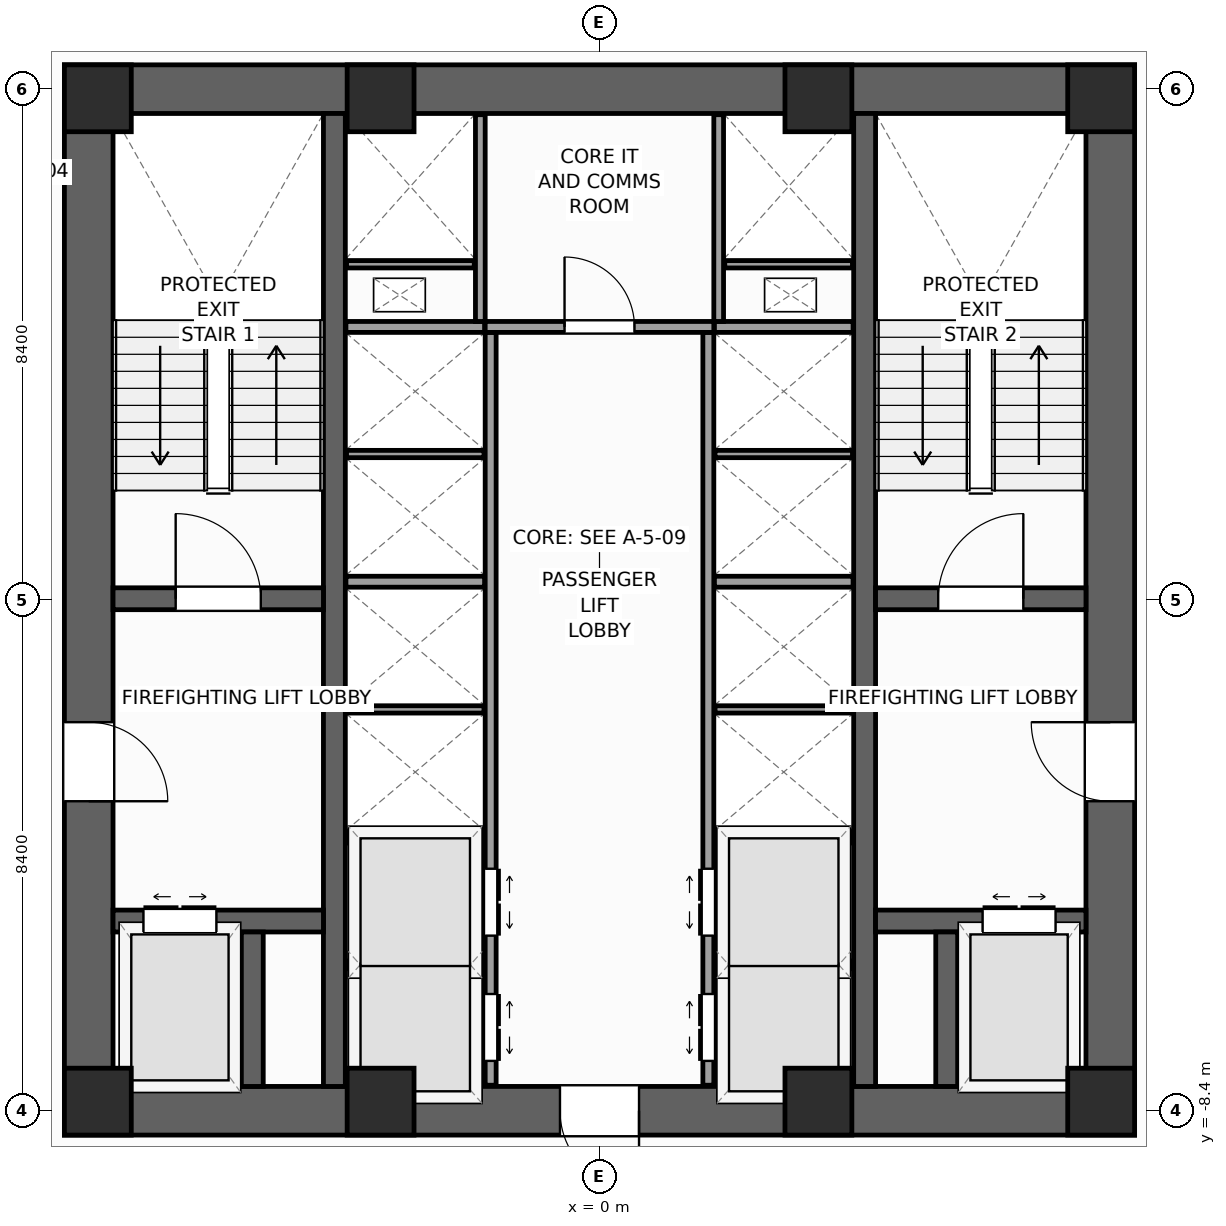
"""IFC4 building model, lengths in metres.
Left out: names, types, materials, properties, quantities, classifications, styles, units other than length and angle.
Written with IfcOpenShell. Run it as: python <this file> out.ifc"""

import sys

from ifc_helpers import new_model, si_unit, direction, frame, frame_2d, origin, origin_2d, place, context, subcontext, project, spatial, rectangle, extrude, source, transform, mapped, element, fill, save


model = new_model("IFC4")
c1 = context("Model", 3, precision=1e-05, world=origin(), true_north=direction((0.0, 1.0)))
c2 = subcontext(c1, "Body", "Model", "MODEL_VIEW")
j1 = project(units=[si_unit("LENGTHUNIT", "METRE"), si_unit("PLANEANGLEUNIT", "RADIAN")], contexts=[c1])
p1 = place(None, origin())
s1 = spatial("IfcSite", under=j1, at=p1, CompositionType="ELEMENT")
p2 = place(p1, origin())
s2 = spatial("IfcBuilding", under=s1, at=p2, CompositionType="ELEMENT")
p3 = place(p2, frame((0.0, 0.0, 46.0)))
s3 = spatial("IfcBuildingStorey", under=s2, at=p3, CompositionType="ELEMENT", Elevation=46.0)
p4 = place(p3, frame((-8.8, -8.4, 0.0), z_axis=(0.0, 0.0, 1.0), x_axis=(1.0, 0.0, 0.0)))
e1 = element("IfcWall", 1, at=p4, inside=s3, PredefinedType="SHEAR", context=c2, shape_type="SweptSolid", body=[
    extrude(rectangle(XDim=17.6, YDim=0.8, at=frame_2d((8.8, 0.0))), origin(), (0.0, 0.0, 1.0), 4.0),
])
p5 = place(p4, frame((8.15, 0.0, 0.0)))
e2 = element("IfcOpeningElement", 2, at=p5, cuts=e1, PredefinedType="OPENING", context=c2, shape_type="SweptSolid", body=[
    extrude(rectangle(XDim=1.3, YDim=2.2, at=frame_2d((0.65, 1.1))), frame((0.0, 0.41, 0.0), z_axis=(0.0, -1.0, 0.0), x_axis=(1.0, 0.0, 0.0)), (0.0, 0.0, 1.0), 0.82),
])
p6 = place(p3, frame((-8.8, 8.4, 0.0), z_axis=(0.0, 0.0, 1.0), x_axis=(1.0, 0.0, 0.0)))
e3 = element("IfcWall", 3, at=p6, inside=s3, PredefinedType="SHEAR", context=c2, shape_type="SweptSolid", body=[
    extrude(rectangle(XDim=17.6, YDim=0.8, at=frame_2d((8.8, 0.0))), origin(), (0.0, 0.0, 1.0), 4.0),
])
p7 = place(p3, frame((-8.4, -8.0, 0.0), z_axis=(0.0, 0.0, 1.0), x_axis=(0.0, 1.0, 0.0)))
e4 = element("IfcWall", 4, at=p7, inside=s3, PredefinedType="SHEAR", context=c2, shape_type="SweptSolid", body=[
    extrude(rectangle(XDim=16.0, YDim=0.8, at=frame_2d((8.0, 0.0))), origin(), (0.0, 0.0, 1.0), 4.0),
])
p8 = place(p7, frame((4.69, 0.0, 0.0)))
e5 = element("IfcOpeningElement", 5, at=p8, cuts=e4, PredefinedType="OPENING", context=c2, shape_type="SweptSolid", body=[
    extrude(rectangle(XDim=1.3, YDim=2.2, at=frame_2d((0.65, 1.1))), frame((0.0, 0.41, 0.0), z_axis=(0.0, -1.0, 0.0), x_axis=(1.0, 0.0, 0.0)), (0.0, 0.0, 1.0), 0.82),
])
p9 = place(p3, frame((8.4, -8.0, 0.0), z_axis=(0.0, 0.0, 1.0), x_axis=(0.0, 1.0, 0.0)))
e6 = element("IfcWall", 6, at=p9, inside=s3, PredefinedType="SHEAR", context=c2, shape_type="SweptSolid", body=[
    extrude(rectangle(XDim=16.0, YDim=0.8, at=frame_2d((8.0, 0.0))), origin(), (0.0, 0.0, 1.0), 4.0),
])
p10 = place(p9, frame((4.69, 0.0, 0.0)))
e7 = element("IfcOpeningElement", 7, at=p10, cuts=e6, PredefinedType="OPENING", context=c2, shape_type="SweptSolid", body=[
    extrude(rectangle(XDim=1.3, YDim=2.2, at=frame_2d((0.65, 1.1))), frame((0.0, 0.41, 0.0), z_axis=(0.0, -1.0, 0.0), x_axis=(1.0, 0.0, 0.0)), (0.0, 0.0, 1.0), 0.82),
])
for number, where, z_axis, x_axis in (
    (8, (-4.36, -8.0, 0.0), (0.0, 0.0, 1.0), (0.0, 1.0, 0.0)),
    (9, (4.36, -8.0, 0.0), (0.0, 0.0, 1.0), (0.0, 1.0, 0.0)),
):
    element("IfcWall", number, at=place(p3, frame(where, z_axis=z_axis, x_axis=x_axis)), inside=s3, PredefinedType="SHEAR", context=c2, shape_type="SweptSolid", body=[
        extrude(rectangle(XDim=16.0, YDim=0.36, at=frame_2d((8.0, 0.0))), origin(), (0.0, 0.0, 1.0), 4.0),
    ])
p11 = place(p3, frame((-8.0, 0.02, 0.0), z_axis=(0.0, 0.0, 1.0), x_axis=(1.0, 0.0, 0.0)))
e10 = element("IfcWall", 10, at=p11, inside=s3, PredefinedType="SHEAR", context=c2, shape_type="SweptSolid", body=[
    extrude(rectangle(XDim=3.46, YDim=0.36, at=frame_2d((1.73, 0.0))), origin(), (0.0, 0.0, 1.0), 4.0),
])
p12 = place(p11, frame((1.03, 0.0, 0.0)))
e11 = element("IfcOpeningElement", 11, at=p12, cuts=e10, PredefinedType="OPENING", context=c2, shape_type="SweptSolid", body=[
    extrude(rectangle(XDim=1.4, YDim=2.2, at=frame_2d((0.7, 1.1))), frame((0.0, 0.19, 0.0), z_axis=(0.0, -1.0, 0.0), x_axis=(1.0, 0.0, 0.0)), (0.0, 0.0, 1.0), 0.38),
])
p13 = place(p3, frame((4.54, 0.02, 0.0), z_axis=(0.0, 0.0, 1.0), x_axis=(1.0, 0.0, 0.0)))
e12 = element("IfcWall", 12, at=p13, inside=s3, PredefinedType="SHEAR", context=c2, shape_type="SweptSolid", body=[
    extrude(rectangle(XDim=3.46, YDim=0.36, at=frame_2d((1.73, 0.0))), origin(), (0.0, 0.0, 1.0), 4.0),
])
p14 = place(p13, frame((1.03, 0.0, 0.0)))
e13 = element("IfcOpeningElement", 13, at=p14, cuts=e12, PredefinedType="OPENING", context=c2, shape_type="SweptSolid", body=[
    extrude(rectangle(XDim=1.4, YDim=2.2, at=frame_2d((0.7, 1.1))), frame((0.0, 0.19, 0.0), z_axis=(0.0, -1.0, 0.0), x_axis=(1.0, 0.0, 0.0)), (0.0, 0.0, 1.0), 0.38),
])
p15 = place(p3, frame((-8.0, -5.28, 0.0), z_axis=(0.0, 0.0, 1.0), x_axis=(1.0, 0.0, 0.0)))
e14 = element("IfcWall", 14, at=p15, inside=s3, PredefinedType="SHEAR", context=c2, shape_type="SweptSolid", body=[
    extrude(rectangle(XDim=3.46, YDim=0.36, at=frame_2d((1.73, 0.0))), origin(), (0.0, 0.0, 1.0), 4.0),
])
p16 = place(p15, frame((0.5, 0.0, 0.0)))
e15 = element("IfcOpeningElement", 15, at=p16, cuts=e14, PredefinedType="OPENING", context=c2, shape_type="SweptSolid", body=[
    extrude(rectangle(XDim=1.2, YDim=2.25, at=frame_2d((0.6, 1.125))), frame((0.0, 0.19, 0.0), z_axis=(0.0, -1.0, 0.0), x_axis=(1.0, 0.0, 0.0)), (0.0, 0.0, 1.0), 0.38),
])
p17 = place(p3, frame((4.54, -5.28, 0.0), z_axis=(0.0, 0.0, 1.0), x_axis=(1.0, 0.0, 0.0)))
e16 = element("IfcWall", 16, at=p17, inside=s3, PredefinedType="SHEAR", context=c2, shape_type="SweptSolid", body=[
    extrude(rectangle(XDim=3.46, YDim=0.36, at=frame_2d((1.73, 0.0))), origin(), (0.0, 0.0, 1.0), 4.0),
])
p18 = place(p17, frame((1.76, 0.0, 0.0)))
e17 = element("IfcOpeningElement", 17, at=p18, cuts=e16, PredefinedType="OPENING", context=c2, shape_type="SweptSolid", body=[
    extrude(rectangle(XDim=1.2, YDim=2.25, at=frame_2d((0.6, 1.125))), frame((0.0, 0.19, 0.0), z_axis=(0.0, -1.0, 0.0), x_axis=(1.0, 0.0, 0.0)), (0.0, 0.0, 1.0), 0.38),
])
for number, where, z_axis, x_axis in (
    (18, (-5.71, -8.0, 0.0), (0.0, 0.0, 1.0), (0.0, 1.0, 0.0)),
    (19, (5.71, -8.0, 0.0), (0.0, 0.0, 1.0), (0.0, 1.0, 0.0)),
):
    element("IfcWall", number, at=place(p3, frame(where, z_axis=z_axis, x_axis=x_axis)), inside=s3, PredefinedType="SHEAR", context=c2, shape_type="SweptSolid", body=[
        extrude(rectangle(XDim=2.54, YDim=0.36, at=frame_2d((1.27, 0.0))), origin(), (0.0, 0.0, 1.0), 4.0),
    ])
m1 = source(origin(), c2, "Body", "SweptSolid", [
    extrude(rectangle(XDim=1.1, YDim=1.1, at=origin_2d()), origin(), (0.0, 0.0, 1.0), 4.0),
])
for number, where, z_axis, x_axis in (
    (20, (-8.25, -8.25, 0.0), (0.0, 0.0, 1.0), (1.0, 0.0, 0.0)),
    (21, (8.25, -8.25, 0.0), (0.0, 0.0, 1.0), (1.0, 0.0, 0.0)),
    (22, (8.25, 8.25, 0.0), (0.0, 0.0, 1.0), (1.0, 0.0, 0.0)),
    (23, (-8.25, 8.25, 0.0), (0.0, 0.0, 1.0), (1.0, 0.0, 0.0)),
    (24, (-3.6, -8.25, 0.0), (0.0, 0.0, 1.0), (1.0, 0.0, 0.0)),
    (25, (3.6, -8.25, 0.0), (0.0, 0.0, 1.0), (1.0, 0.0, 0.0)),
    (26, (-3.6, 8.25, 0.0), (0.0, 0.0, 1.0), (1.0, 0.0, 0.0)),
    (27, (3.6, 8.25, 0.0), (0.0, 0.0, 1.0), (1.0, 0.0, 0.0)),
):
    element("IfcColumn", number, at=place(p3, frame(where, z_axis=z_axis, x_axis=x_axis)), inside=s3, PredefinedType="PILASTER", context=c2, shape_type="MappedRepresentation", body=[
        mapped(m1, transform((0.0, 0.0, 0.0), scale=1.0)),
    ])
p19 = place(p3, frame((-1.79, -7.98, 0.0), z_axis=(0.0, 0.0, 1.0), x_axis=(0.0, 1.0, 0.0)))
e28 = element("IfcWall", 28, at=p19, inside=s3, PredefinedType="PARTITIONING", context=c2, shape_type="SweptSolid", body=[
    extrude(rectangle(XDim=12.38, YDim=0.18, at=frame_2d((6.19, 0.0))), origin(), (0.0, 0.0, 1.0), 3.72),
])
p20 = place(p19, frame((0.4, 0.0, 0.0)))
e29 = element("IfcOpeningElement", 29, at=p20, cuts=e28, PredefinedType="OPENING", context=c2, shape_type="SweptSolid", body=[
    extrude(rectangle(XDim=1.1, YDim=2.2, at=frame_2d((0.55, 1.1))), frame((0.0, 0.1, 0.0), z_axis=(0.0, -1.0, 0.0), x_axis=(1.0, 0.0, 0.0)), (0.0, 0.0, 1.0), 0.2),
])
p21 = place(p19, frame((2.46, 0.0, 0.0)))
e30 = element("IfcOpeningElement", 30, at=p21, cuts=e28, PredefinedType="OPENING", context=c2, shape_type="SweptSolid", body=[
    extrude(rectangle(XDim=1.1, YDim=2.2, at=frame_2d((0.55, 1.1))), frame((0.0, 0.1, 0.0), z_axis=(0.0, -1.0, 0.0), x_axis=(1.0, 0.0, 0.0)), (0.0, 0.0, 1.0), 0.2),
])
p22 = place(p3, frame((1.79, -7.98, 0.0), z_axis=(0.0, 0.0, 1.0), x_axis=(0.0, 1.0, 0.0)))
e31 = element("IfcWall", 31, at=p22, inside=s3, PredefinedType="PARTITIONING", context=c2, shape_type="SweptSolid", body=[
    extrude(rectangle(XDim=12.38, YDim=0.18, at=frame_2d((6.19, 0.0))), origin(), (0.0, 0.0, 1.0), 3.72),
])
p23 = place(p22, frame((0.4, 0.0, 0.0)))
e32 = element("IfcOpeningElement", 32, at=p23, cuts=e31, PredefinedType="OPENING", context=c2, shape_type="SweptSolid", body=[
    extrude(rectangle(XDim=1.1, YDim=2.2, at=frame_2d((0.55, 1.1))), frame((0.0, 0.1, 0.0), z_axis=(0.0, -1.0, 0.0), x_axis=(1.0, 0.0, 0.0)), (0.0, 0.0, 1.0), 0.2),
])
p24 = place(p22, frame((2.46, 0.0, 0.0)))
e33 = element("IfcOpeningElement", 33, at=p24, cuts=e31, PredefinedType="OPENING", context=c2, shape_type="SweptSolid", body=[
    extrude(rectangle(XDim=1.1, YDim=2.2, at=frame_2d((0.55, 1.1))), frame((0.0, 0.1, 0.0), z_axis=(0.0, -1.0, 0.0), x_axis=(1.0, 0.0, 0.0)), (0.0, 0.0, 1.0), 0.2),
])
p25 = place(p3, frame((-1.88, 4.49, 0.0), z_axis=(0.0, 0.0, 1.0), x_axis=(1.0, 0.0, 0.0)))
e34 = element("IfcWall", 34, at=p25, inside=s3, PredefinedType="PARTITIONING", context=c2, shape_type="SweptSolid", body=[
    extrude(rectangle(XDim=3.76, YDim=0.18, at=frame_2d((1.88, 0.0))), origin(), (0.0, 0.0, 1.0), 3.72),
])
p26 = place(p25, frame((1.305, 0.0, 0.0)))
e35 = element("IfcOpeningElement", 35, at=p26, cuts=e34, PredefinedType="OPENING", context=c2, shape_type="SweptSolid", body=[
    extrude(rectangle(XDim=1.15, YDim=2.25, at=frame_2d((0.575, 1.125))), frame((0.0, 0.1, 0.0), z_axis=(0.0, -1.0, 0.0), x_axis=(1.0, 0.0, 0.0)), (0.0, 0.0, 1.0), 0.2),
])
for number, where, z_axis, x_axis in (
    (36, (-4.17, -3.9, 0.0), (0.0, 0.0, 1.0), (1.0, 0.0, 0.0)),
    (37, (1.89, -3.9, 0.0), (0.0, 0.0, 1.0), (1.0, 0.0, 0.0)),
    (38, (-4.17, 0.3, 0.0), (0.0, 0.0, 1.0), (1.0, 0.0, 0.0)),
    (39, (1.89, 0.3, 0.0), (0.0, 0.0, 1.0), (1.0, 0.0, 0.0)),
    (40, (-4.17, 4.49, 0.0), (0.0, 0.0, 1.0), (1.0, 0.0, 0.0)),
    (41, (1.89, 4.49, 0.0), (0.0, 0.0, 1.0), (1.0, 0.0, 0.0)),
):
    element("IfcWall", number, at=place(p3, frame(where, z_axis=z_axis, x_axis=x_axis)), inside=s3, PredefinedType="PARTITIONING", context=c2, shape_type="SweptSolid", body=[
        extrude(rectangle(XDim=2.28, YDim=0.18, at=frame_2d((1.14, 0.0))), origin(), (0.0, 0.0, 1.0), 3.72),
    ])
for number, where, z_axis, x_axis in (
    (42, (-4.16, -6.0, 0.0), (0.0, 0.0, 1.0), (1.0, 0.0, 0.0)),
    (43, (1.9, -6.0, 0.0), (0.0, 0.0, 1.0), (1.0, 0.0, 0.0)),
    (44, (-4.16, -1.8, 0.0), (0.0, 0.0, 1.0), (1.0, 0.0, 0.0)),
    (45, (1.9, -1.8, 0.0), (0.0, 0.0, 1.0), (1.0, 0.0, 0.0)),
    (46, (-4.16, 2.4, 0.0), (0.0, 0.0, 1.0), (1.0, 0.0, 0.0)),
    (47, (1.9, 2.4, 0.0), (0.0, 0.0, 1.0), (1.0, 0.0, 0.0)),
):
    element("IfcWall", number, at=place(p3, frame(where, z_axis=z_axis, x_axis=x_axis)), inside=s3, PredefinedType="PARTITIONING", context=c2, shape_type="SweptSolid", body=[
        extrude(rectangle(XDim=2.26, YDim=0.12, at=frame_2d((1.13, 0.0))), origin(), (0.0, 0.0, 1.0), 3.72),
    ])
for number, where, z_axis, x_axis in (
    (48, (-1.96, 4.58, 0.0), (0.0, 0.0, 1.0), (0.0, 1.0, 0.0)),
    (49, (1.96, 4.58, 0.0), (0.0, 0.0, 1.0), (0.0, 1.0, 0.0)),
):
    element("IfcWall", number, at=place(p3, frame(where, z_axis=z_axis, x_axis=x_axis)), inside=s3, PredefinedType="PARTITIONING", context=c2, shape_type="SweptSolid", body=[
        extrude(rectangle(XDim=3.4, YDim=0.16, at=frame_2d((1.7, 0.0))), origin(), (0.0, 0.0, 1.0), 3.72),
    ])
for number, where, z_axis, x_axis in (
    (50, (-4.16, 5.52, 0.0), (0.0, 0.0, 1.0), (1.0, 0.0, 0.0)),
    (51, (2.06, 5.52, 0.0), (0.0, 0.0, 1.0), (1.0, 0.0, 0.0)),
):
    element("IfcWall", number, at=place(p3, frame(where, z_axis=z_axis, x_axis=x_axis)), inside=s3, PredefinedType="PARTITIONING", context=c2, shape_type="SweptSolid", body=[
        extrude(rectangle(XDim=2.1, YDim=0.12, at=frame_2d((1.05, 0.0))), origin(), (0.0, 0.0, 1.0), 3.72),
    ])
m2 = source(origin(), c2, "Body", "SweptSolid", [
    extrude(rectangle(XDim=1.4, YDim=2.2, at=frame_2d((0.7, 1.1))), frame((0.0, 0.025, 0.0), z_axis=(0.0, -1.0, 0.0), x_axis=(1.0, 0.0, 0.0)), (0.0, 0.0, 1.0), 0.05),
])
p27 = place(p12, origin())
e52 = element("IfcDoor", 52, at=p27, inside=s3, OperationType="SINGLE_SWING_LEFT", PredefinedType="DOOR", context=c2, shape_type="MappedRepresentation", body=[
    mapped(m2, transform((0.0, 0.0, 0.0), scale=1.0)),
])
fill(e11, e52)
p28 = place(p14, origin())
e53 = element("IfcDoor", 53, at=p28, inside=s3, OperationType="SINGLE_SWING_RIGHT", PredefinedType="DOOR", context=c2, shape_type="MappedRepresentation", body=[
    mapped(m2, transform((0.0, 0.0, 0.0), scale=1.0)),
])
fill(e13, e53)
m3 = source(origin(), c2, "Body", "SweptSolid", [
    extrude(rectangle(XDim=1.3, YDim=2.2, at=frame_2d((0.65, 1.1))), frame((0.0, 0.025, 0.0), z_axis=(0.0, -1.0, 0.0), x_axis=(1.0, 0.0, 0.0)), (0.0, 0.0, 1.0), 0.05),
])
p29 = place(p8, frame((1.3, 0.0, 0.0), z_axis=(0.0, 0.0, 1.0), x_axis=(-1.0, 0.0, 0.0)))
e54 = element("IfcDoor", 54, at=p29, inside=s3, OperationType="SINGLE_SWING_LEFT", PredefinedType="DOOR", context=c2, shape_type="MappedRepresentation", body=[
    mapped(m3, transform((0.0, 0.0, 0.0), scale=1.0)),
])
fill(e5, e54)
p30 = place(p10, origin())
e55 = element("IfcDoor", 55, at=p30, inside=s3, OperationType="SINGLE_SWING_RIGHT", PredefinedType="DOOR", context=c2, shape_type="MappedRepresentation", body=[
    mapped(m3, transform((0.0, 0.0, 0.0), scale=1.0)),
])
fill(e7, e55)
p31 = place(p5, frame((1.3, 0.0, 0.0), z_axis=(0.0, 0.0, 1.0), x_axis=(-1.0, 0.0, 0.0)))
e56 = element("IfcDoor", 56, at=p31, inside=s3, OperationType="SINGLE_SWING_RIGHT", PredefinedType="DOOR", context=c2, shape_type="MappedRepresentation", body=[
    mapped(m3, transform((0.0, 0.0, 0.0), scale=1.0)),
])
fill(e2, e56)
m4 = source(origin(), c2, "Body", "SweptSolid", [
    extrude(rectangle(XDim=1.2, YDim=2.25, at=frame_2d((0.6, 1.125))), frame((0.0, 0.025, 0.0), z_axis=(0.0, -1.0, 0.0), x_axis=(1.0, 0.0, 0.0)), (0.0, 0.0, 1.0), 0.05),
])
p32 = place(p16, origin())
e57 = element("IfcDoor", 57, at=p32, inside=s3, OperationType="DOUBLE_DOOR_SLIDING", PredefinedType="DOOR", context=c2, shape_type="MappedRepresentation", body=[
    mapped(m4, transform((0.0, 0.0, 0.0), scale=1.0)),
])
fill(e15, e57)
p33 = place(p18, origin())
e58 = element("IfcDoor", 58, at=p33, inside=s3, OperationType="DOUBLE_DOOR_SLIDING", PredefinedType="DOOR", context=c2, shape_type="MappedRepresentation", body=[
    mapped(m4, transform((0.0, 0.0, 0.0), scale=1.0)),
])
fill(e17, e58)
m5 = source(origin(), c2, "Body", "SweptSolid", [
    extrude(rectangle(XDim=1.1, YDim=2.2, at=frame_2d((0.55, 1.1))), frame((0.0, 0.025, 0.0), z_axis=(0.0, -1.0, 0.0), x_axis=(1.0, 0.0, 0.0)), (0.0, 0.0, 1.0), 0.05),
])
p34 = place(p20, frame((1.1, 0.0, 0.0), z_axis=(0.0, 0.0, 1.0), x_axis=(-1.0, 0.0, 0.0)))
e59 = element("IfcDoor", 59, at=p34, inside=s3, OperationType="DOUBLE_DOOR_SLIDING", PredefinedType="DOOR", context=c2, shape_type="MappedRepresentation", body=[
    mapped(m5, transform((0.0, 0.0, 0.0), scale=1.0)),
])
fill(e29, e59)
p35 = place(p21, frame((1.1, 0.0, 0.0), z_axis=(0.0, 0.0, 1.0), x_axis=(-1.0, 0.0, 0.0)))
e60 = element("IfcDoor", 60, at=p35, inside=s3, OperationType="DOUBLE_DOOR_SLIDING", PredefinedType="DOOR", context=c2, shape_type="MappedRepresentation", body=[
    mapped(m5, transform((0.0, 0.0, 0.0), scale=1.0)),
])
fill(e30, e60)
p36 = place(p23, origin())
e61 = element("IfcDoor", 61, at=p36, inside=s3, OperationType="DOUBLE_DOOR_SLIDING", PredefinedType="DOOR", context=c2, shape_type="MappedRepresentation", body=[
    mapped(m5, transform((0.0, 0.0, 0.0), scale=1.0)),
])
fill(e32, e61)
p37 = place(p24, origin())
e62 = element("IfcDoor", 62, at=p37, inside=s3, OperationType="DOUBLE_DOOR_SLIDING", PredefinedType="DOOR", context=c2, shape_type="MappedRepresentation", body=[
    mapped(m5, transform((0.0, 0.0, 0.0), scale=1.0)),
])
fill(e33, e62)
m6 = source(origin(), c2, "Body", "SweptSolid", [
    extrude(rectangle(XDim=1.15, YDim=2.25, at=frame_2d((0.575, 1.125))), frame((0.0, 0.025, 0.0), z_axis=(0.0, -1.0, 0.0), x_axis=(1.0, 0.0, 0.0)), (0.0, 0.0, 1.0), 0.05),
])
p38 = place(p26, origin())
e63 = element("IfcDoor", 63, at=p38, inside=s3, OperationType="SINGLE_SWING_LEFT", PredefinedType="DOOR", context=c2, shape_type="MappedRepresentation", body=[
    mapped(m6, transform((0.0, 0.0, 0.0), scale=1.0)),
])
fill(e35, e63)
save(model, sys.argv[1])
